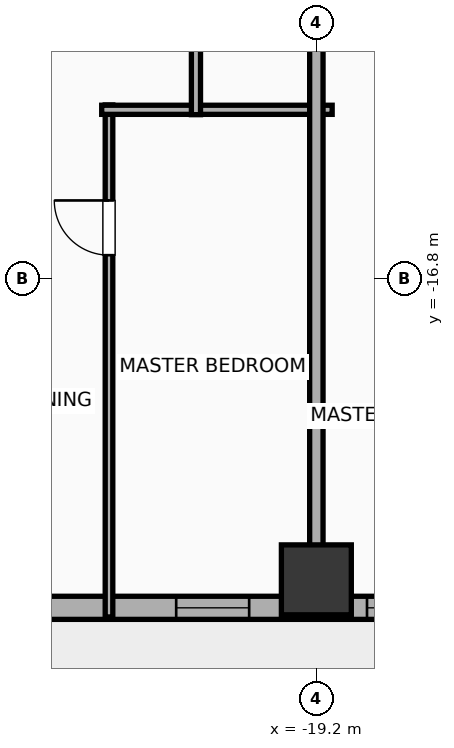
"""IFC4 building model, lengths in metres.
Left out: names, types, materials, properties, quantities, classifications, styles, units other than length and angle.
Written with IfcOpenShell. Run it as: python <this file> out.ifc"""

import sys

from ifc_helpers import new_model, si_unit, direction, frame, frame_2d, origin, origin_2d, place, context, subcontext, project, spatial, rectangle, hollow_rectangle, extrude, element, fill, save


model = new_model("IFC4")
c1 = context("Model", 3, precision=1e-05, world=origin(), true_north=direction((0.0, 1.0)))
c2 = subcontext(c1, "Body", "Model", "MODEL_VIEW")
j1 = project(units=[si_unit("LENGTHUNIT", "METRE"), si_unit("PLANEANGLEUNIT", "RADIAN")], contexts=[c1])
p1 = place(None, origin())
s1 = spatial("IfcSite", under=j1, at=p1, CompositionType="ELEMENT")
p2 = place(p1, origin())
s2 = spatial("IfcBuilding", under=s1, at=p2, CompositionType="ELEMENT")
p3 = place(p2, frame((0.0, 0.0, 53.3)))
s3 = spatial("IfcBuildingStorey", under=s2, at=p3, CompositionType="ELEMENT", Elevation=53.3)
p4 = place(p3, frame((-19.2, -21.75, 0.0), z_axis=(0.0, 0.0, 1.0), x_axis=(1.0, 0.0, 0.0)))
e1 = element("IfcColumn", 1, at=p4, inside=s3, PredefinedType="COLUMN", context=c2, shape_type="SweptSolid", body=[
    extrude(hollow_rectangle(XDim=1.15, YDim=1.15, WallThickness=0.04, at=origin_2d()), origin(), (0.0, 0.0, 1.0), 3.9),
])
p5 = place(p3, frame((22.381, -22.21, 0.0), z_axis=(0.0, 0.0, 1.0), x_axis=(-1.0, 0.0, 0.0)))
e2 = element("IfcWall", 2, at=p5, inside=s3, PredefinedType="ELEMENTEDWALL", context=c2, shape_type="SweptSolid", body=[
    extrude(rectangle(XDim=51.963, YDim=0.38, at=frame_2d((25.981, 0.0))), origin(), (0.0, 0.0, 1.0), 3.65),
])
p6 = place(p5, frame((14.839, 0.0, 0.0)))
e3 = element("IfcOpeningElement", 3, at=p6, cuts=e2, PredefinedType="OPENING", context=c2, shape_type="SweptSolid", body=[
    extrude(rectangle(XDim=1.5, YDim=2.05, at=frame_2d((0.75, 1.025))), frame((0.0, 0.2, 0.0), z_axis=(0.0, -1.0, 0.0), x_axis=(1.0, 0.0, 0.0)), (0.0, 0.0, 1.0), 0.4),
])
p7 = place(p5, frame((6.61, 0.0, 0.75)))
e4 = element("IfcOpeningElement", 4, at=p7, cuts=e2, PredefinedType="OPENING", context=c2, shape_type="SweptSolid", body=[
    extrude(rectangle(XDim=2.4, YDim=2.1, at=frame_2d((1.2, 1.05))), frame((0.0, 0.2, 0.0), z_axis=(0.0, -1.0, 0.0), x_axis=(1.0, 0.0, 0.0)), (0.0, 0.0, 1.0), 0.4),
])
p8 = place(p5, frame((24.781, 0.0, 0.75)))
e5 = element("IfcOpeningElement", 5, at=p8, cuts=e2, PredefinedType="OPENING", context=c2, shape_type="SweptSolid", body=[
    extrude(rectangle(XDim=2.4, YDim=2.1, at=frame_2d((1.2, 1.05))), frame((0.0, 0.2, 0.0), z_axis=(0.0, -1.0, 0.0), x_axis=(1.0, 0.0, 0.0)), (0.0, 0.0, 1.0), 0.4),
])
p9 = place(p5, frame((49.281, 0.0, 0.75)))
e6 = element("IfcOpeningElement", 6, at=p9, cuts=e2, PredefinedType="OPENING", context=c2, shape_type="SweptSolid", body=[
    extrude(rectangle(XDim=1.2, YDim=2.05, at=frame_2d((0.6, 1.025))), frame((0.0, 0.2, 0.0), z_axis=(0.0, -1.0, 0.0), x_axis=(1.0, 0.0, 0.0)), (0.0, 0.0, 1.0), 0.4),
])
p10 = place(p5, frame((46.241, 0.0, 0.75)))
e7 = element("IfcOpeningElement", 7, at=p10, cuts=e2, PredefinedType="OPENING", context=c2, shape_type="SweptSolid", body=[
    extrude(rectangle(XDim=1.2, YDim=2.05, at=frame_2d((0.6, 1.025))), frame((0.0, 0.2, 0.0), z_axis=(0.0, -1.0, 0.0), x_axis=(1.0, 0.0, 0.0)), (0.0, 0.0, 1.0), 0.4),
])
p11 = place(p5, frame((42.686, 0.0, 0.75)))
e8 = element("IfcOpeningElement", 8, at=p11, cuts=e2, PredefinedType="OPENING", context=c2, shape_type="SweptSolid", body=[
    extrude(rectangle(XDim=1.2, YDim=2.05, at=frame_2d((0.6, 1.025))), frame((0.0, 0.2, 0.0), z_axis=(0.0, -1.0, 0.0), x_axis=(1.0, 0.0, 0.0)), (0.0, 0.0, 1.0), 0.4),
])
p12 = place(p5, frame((39.548, 0.0, 0.75)))
e9 = element("IfcOpeningElement", 9, at=p12, cuts=e2, PredefinedType="OPENING", context=c2, shape_type="SweptSolid", body=[
    extrude(rectangle(XDim=1.2, YDim=2.05, at=frame_2d((0.6, 1.025))), frame((0.0, 0.2, 0.0), z_axis=(0.0, -1.0, 0.0), x_axis=(1.0, 0.0, 0.0)), (0.0, 0.0, 1.0), 0.4),
])
p13 = place(p5, frame((34.748, 0.0, 0.75)))
e10 = element("IfcOpeningElement", 10, at=p13, cuts=e2, PredefinedType="OPENING", context=c2, shape_type="SweptSolid", body=[
    extrude(rectangle(XDim=1.2, YDim=2.05, at=frame_2d((0.6, 1.025))), frame((0.0, 0.2, 0.0), z_axis=(0.0, -1.0, 0.0), x_axis=(1.0, 0.0, 0.0)), (0.0, 0.0, 1.0), 0.4),
])
p14 = place(p5, frame((29.226, 0.0, 0.75)))
e11 = element("IfcOpeningElement", 11, at=p14, cuts=e2, PredefinedType="OPENING", context=c2, shape_type="SweptSolid", body=[
    extrude(rectangle(XDim=1.2, YDim=2.05, at=frame_2d((0.6, 1.025))), frame((0.0, 0.2, 0.0), z_axis=(0.0, -1.0, 0.0), x_axis=(1.0, 0.0, 0.0)), (0.0, 0.0, 1.0), 0.4),
])
p15 = place(p5, frame((21.568, 0.0, 0.75)))
e12 = element("IfcOpeningElement", 12, at=p15, cuts=e2, PredefinedType="OPENING", context=c2, shape_type="SweptSolid", body=[
    extrude(rectangle(XDim=0.52, YDim=2.05, at=frame_2d((0.26, 1.025))), frame((0.0, 0.2, 0.0), z_axis=(0.0, -1.0, 0.0), x_axis=(1.0, 0.0, 0.0)), (0.0, 0.0, 1.0), 0.4),
])
p16 = place(p5, frame((11.146, 0.0, 0.75)))
e13 = element("IfcOpeningElement", 13, at=p16, cuts=e2, PredefinedType="OPENING", context=c2, shape_type="SweptSolid", body=[
    extrude(rectangle(XDim=1.2, YDim=2.05, at=frame_2d((0.6, 1.025))), frame((0.0, 0.2, 0.0), z_axis=(0.0, -1.0, 0.0), x_axis=(1.0, 0.0, 0.0)), (0.0, 0.0, 1.0), 0.4),
])
p17 = place(p5, frame((1.436, 0.0, 0.75)))
e14 = element("IfcOpeningElement", 14, at=p17, cuts=e2, PredefinedType="OPENING", context=c2, shape_type="SweptSolid", body=[
    extrude(rectangle(XDim=1.2, YDim=2.05, at=frame_2d((0.6, 1.025))), frame((0.0, 0.2, 0.0), z_axis=(0.0, -1.0, 0.0), x_axis=(1.0, 0.0, 0.0)), (0.0, 0.0, 1.0), 0.4),
])
p18 = place(p3, frame((-22.61, -22.36, 0.0), z_axis=(0.0, 0.0, 1.0), x_axis=(0.0, 1.0, 0.0)))
e15 = element("IfcWall", 15, at=p18, inside=s3, PredefinedType="PARTITIONING", context=c2, shape_type="SweptSolid", body=[
    extrude(rectangle(XDim=8.42, YDim=0.125, at=frame_2d((4.21, 0.0))), origin(), (0.0, 0.0, 1.0), 3.65),
])
p19 = place(p18, frame((5.949, 0.0, 0.0)))
e16 = element("IfcOpeningElement", 16, at=p19, cuts=e15, PredefinedType="OPENING", context=c2, shape_type="SweptSolid", body=[
    extrude(rectangle(XDim=0.9, YDim=2.05, at=frame_2d((0.45, 1.025))), frame((0.0, 0.073, 0.0), z_axis=(0.0, -1.0, 0.0), x_axis=(1.0, 0.0, 0.0)), (0.0, 0.0, 1.0), 0.145),
])
p20 = place(p3, frame((-22.73, -14.02, 0.0), z_axis=(0.0, 0.0, 1.0), x_axis=(1.0, 0.0, 0.0)))
e17 = element("IfcWall", 17, at=p20, inside=s3, PredefinedType="PLUMBINGWALL", context=c2, shape_type="SweptSolid", body=[
    extrude(rectangle(XDim=3.79, YDim=0.15, at=frame_2d((1.895, 0.0))), origin(), (0.0, 0.0, 1.0), 3.65),
])
p21 = place(p3, frame((-21.18, -14.1, 0.0), z_axis=(0.0, 0.0, 1.0), x_axis=(0.0, 1.0, 0.0)))
e18 = element("IfcWall", 18, at=p21, inside=s3, PredefinedType="PLUMBINGWALL", context=c2, shape_type="SweptSolid", body=[
    extrude(rectangle(XDim=3.32, YDim=0.15, at=frame_2d((1.66, 0.0))), origin(), (0.0, 0.0, 1.0), 3.65),
])
p22 = place(p21, frame((1.21, 0.0, 0.0)))
e19 = element("IfcOpeningElement", 19, at=p22, cuts=e18, PredefinedType="OPENING", context=c2, shape_type="SweptSolid", body=[
    extrude(rectangle(XDim=0.9, YDim=2.05, at=frame_2d((0.45, 1.025))), frame((0.0, 0.085, 0.0), z_axis=(0.0, -1.0, 0.0), x_axis=(1.0, 0.0, 0.0)), (0.0, 0.0, 1.0), 0.17),
])
p23 = place(p3, frame((-19.2, -22.21, 0.0), z_axis=(0.0, 0.0, 1.0), x_axis=(0.0, 1.0, 0.0)))
e20 = element("IfcWall", 20, at=p23, inside=s3, PredefinedType="PARTITIONING", context=c2, shape_type="SweptSolid", body=[
    extrude(rectangle(XDim=11.49, YDim=0.22, at=frame_2d((5.745, 0.0))), origin(), (0.0, 0.0, 1.0), 2.94),
])
p24 = place(p11, origin())
e21 = element("IfcWindow", 21, at=p24, inside=s3, PartitioningType="SINGLE_PANEL", PredefinedType="WINDOW", context=c2, shape_type="SweptSolid", body=[
    extrude(rectangle(XDim=1.2, YDim=2.05, at=frame_2d((0.6, 1.025))), frame((0.0, 0.03, 0.0), z_axis=(0.0, -1.0, 0.0), x_axis=(1.0, 0.0, 0.0)), (0.0, 0.0, 1.0), 0.06),
])
fill(e8, e21)
p25 = place(p12, origin())
e22 = element("IfcWindow", 22, at=p25, inside=s3, PartitioningType="SINGLE_PANEL", PredefinedType="WINDOW", context=c2, shape_type="SweptSolid", body=[
    extrude(rectangle(XDim=1.2, YDim=2.05, at=frame_2d((0.6, 1.025))), frame((0.0, 0.03, 0.0), z_axis=(0.0, -1.0, 0.0), x_axis=(1.0, 0.0, 0.0)), (0.0, 0.0, 1.0), 0.06),
])
fill(e9, e22)
p26 = place(p19, origin())
e23 = element("IfcDoor", 23, at=p26, inside=s3, OperationType="SINGLE_SWING_RIGHT", PredefinedType="DOOR", context=c2, shape_type="SweptSolid", body=[
    extrude(rectangle(XDim=0.9, YDim=2.05, at=frame_2d((0.45, 1.025))), frame((0.0, 0.025, 0.0), z_axis=(0.0, -1.0, 0.0), x_axis=(1.0, 0.0, 0.0)), (0.0, 0.0, 1.0), 0.05),
])
fill(e16, e23)
save(model, sys.argv[1])
